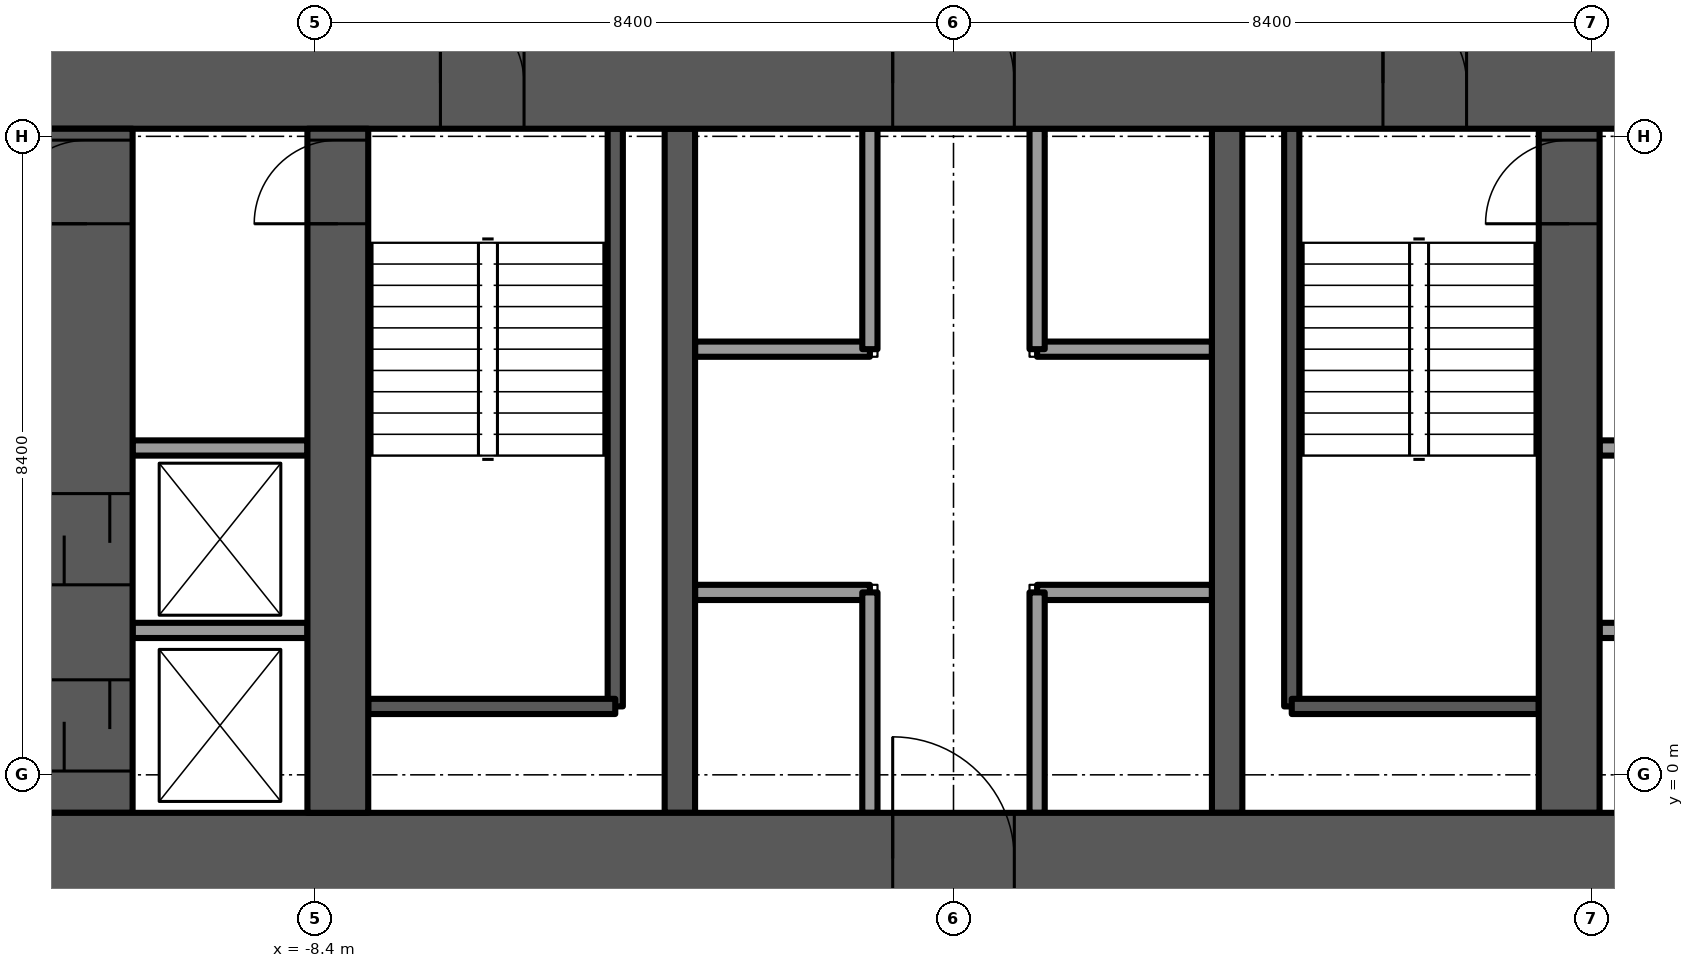
"""IFC4 building model, lengths in metres.
Left out: names, types, materials, properties, quantities, classifications, styles, units other than length and angle.
Written with IfcOpenShell. Run it as: python <this file> out.ifc"""

import sys

from ifc_helpers import new_model, si_unit, direction, frame, frame_2d, origin, place, context, subcontext, project, spatial, rectangle, extrude, element, fill, save


model = new_model("IFC4")
c1 = context("Model", 3, precision=1e-05, world=origin(), true_north=direction((0.0, 1.0)))
c2 = subcontext(c1, "Body", "Model", "MODEL_VIEW")
j1 = project(units=[si_unit("LENGTHUNIT", "METRE"), si_unit("PLANEANGLEUNIT", "RADIAN")], contexts=[c1])
p1 = place(None, origin())
s1 = spatial("IfcSite", under=j1, at=p1, CompositionType="ELEMENT")
p2 = place(p1, origin())
s2 = spatial("IfcBuilding", under=s1, at=p2, CompositionType="ELEMENT")
p3 = place(p2, frame((0.0, 0.0, 50.5)))
s3 = spatial("IfcBuildingStorey", under=s2, at=p3, CompositionType="ELEMENT", Elevation=50.5)
p4 = place(p3, frame((-12.0, -1.1, -0.3), z_axis=(0.0, 0.0, 1.0), x_axis=(1.0, 0.0, 0.0)))
e1 = element("IfcWall", 1, at=p4, inside=s3, PredefinedType="SHEAR", context=c2, shape_type="SweptSolid", body=[
    extrude(rectangle(XDim=24.0, YDim=1.2, at=frame_2d((12.0, 0.0))), origin(), (0.0, 0.0, 1.0), 3.75),
])
p5 = place(p4, frame((11.2, 0.0, 0.0)))
e2 = element("IfcOpeningElement", 2, at=p5, cuts=e1, PredefinedType="OPENING", context=c2, shape_type="SweptSolid", body=[
    extrude(rectangle(XDim=1.6, YDim=2.1, at=frame_2d((0.8, 1.05))), frame((0.0, 0.6, 0.0), z_axis=(0.0, -1.0, 0.0), x_axis=(1.0, 0.0, 0.0)), (0.0, 0.0, 1.0), 1.2),
])
p6 = place(p3, frame((-12.0, 9.1, -0.3), z_axis=(0.0, 0.0, 1.0), x_axis=(1.0, 0.0, 0.0)))
e3 = element("IfcWall", 3, at=p6, inside=s3, PredefinedType="SHEAR", context=c2, shape_type="SweptSolid", body=[
    extrude(rectangle(XDim=24.0, YDim=1.2, at=frame_2d((12.0, 0.0))), origin(), (0.0, 0.0, 1.0), 3.75),
])
p7 = place(p6, frame((11.2, 0.0, 0.0)))
e4 = element("IfcOpeningElement", 4, at=p7, cuts=e3, PredefinedType="OPENING", context=c2, shape_type="SweptSolid", body=[
    extrude(rectangle(XDim=1.6, YDim=2.1, at=frame_2d((0.8, 1.05))), frame((0.0, 0.6, 0.0), z_axis=(0.0, -1.0, 0.0), x_axis=(1.0, 0.0, 0.0)), (0.0, 0.0, 1.0), 1.2),
])
p8 = place(p6, frame((5.25, 0.0, 0.0)))
e5 = element("IfcOpeningElement", 5, at=p8, cuts=e3, PredefinedType="OPENING", context=c2, shape_type="SweptSolid", body=[
    extrude(rectangle(XDim=1.1, YDim=2.1, at=frame_2d((0.55, 1.05))), frame((0.0, 0.6, 0.0), z_axis=(0.0, -1.0, 0.0), x_axis=(1.0, 0.0, 0.0)), (0.0, 0.0, 1.0), 1.2),
])
p9 = place(p6, frame((17.65, 0.0, 0.0)))
e6 = element("IfcOpeningElement", 6, at=p9, cuts=e3, PredefinedType="OPENING", context=c2, shape_type="SweptSolid", body=[
    extrude(rectangle(XDim=1.1, YDim=2.1, at=frame_2d((0.55, 1.05))), frame((0.0, 0.6, 0.0), z_axis=(0.0, -1.0, 0.0), x_axis=(1.0, 0.0, 0.0)), (0.0, 0.0, 1.0), 1.2),
])
p10 = place(p3, frame((-8.1, -0.5, -0.3), z_axis=(0.0, 0.0, 1.0), x_axis=(0.0, 1.0, 0.0)))
e7 = element("IfcWall", 7, at=p10, inside=s3, PredefinedType="SHEAR", context=c2, shape_type="SweptSolid", body=[
    extrude(rectangle(XDim=9.0, YDim=0.8, at=frame_2d((4.5, 0.0))), origin(), (0.0, 0.0, 1.0), 3.75),
])
p11 = place(p10, frame((7.75, 0.0, 0.0)))
e8 = element("IfcOpeningElement", 8, at=p11, cuts=e7, PredefinedType="OPENING", context=c2, shape_type="SweptSolid", body=[
    extrude(rectangle(XDim=1.1, YDim=2.1, at=frame_2d((0.55, 1.05))), frame((0.0, 0.4, 0.0), z_axis=(0.0, -1.0, 0.0), x_axis=(1.0, 0.0, 0.0)), (0.0, 0.0, 1.0), 0.8),
])
p12 = place(p3, frame((8.1, -0.5, -0.3), z_axis=(0.0, 0.0, 1.0), x_axis=(0.0, 1.0, 0.0)))
e9 = element("IfcWall", 9, at=p12, inside=s3, PredefinedType="SHEAR", context=c2, shape_type="SweptSolid", body=[
    extrude(rectangle(XDim=9.0, YDim=0.8, at=frame_2d((4.5, 0.0))), origin(), (0.0, 0.0, 1.0), 3.75),
])
p13 = place(p12, frame((7.75, 0.0, 0.0)))
e10 = element("IfcOpeningElement", 10, at=p13, cuts=e9, PredefinedType="OPENING", context=c2, shape_type="SweptSolid", body=[
    extrude(rectangle(XDim=1.1, YDim=2.1, at=frame_2d((0.55, 1.05))), frame((0.0, 0.4, 0.0), z_axis=(0.0, -1.0, 0.0), x_axis=(1.0, 0.0, 0.0)), (0.0, 0.0, 1.0), 0.8),
])
for number, where, z_axis, x_axis in (
    (11, (-3.6, -0.5, -0.3), (0.0, 0.0, 1.0), (0.0, 1.0, 0.0)),
    (12, (3.6, -0.5, -0.3), (0.0, 0.0, 1.0), (0.0, 1.0, 0.0)),
):
    element("IfcWall", number, at=place(p3, frame(where, z_axis=z_axis, x_axis=x_axis)), inside=s3, PredefinedType="SHEAR", context=c2, shape_type="SweptSolid", body=[
        extrude(rectangle(XDim=9.0, YDim=0.4, at=frame_2d((4.5, 0.0))), origin(), (0.0, 0.0, 1.0), 3.75),
    ])
p14 = place(p3, frame((-11.4, -0.5, -0.3), z_axis=(0.0, 0.0, 1.0), x_axis=(0.0, 1.0, 0.0)))
e13 = element("IfcWall", 13, at=p14, inside=s3, PredefinedType="SHEAR", context=c2, shape_type="SweptSolid", body=[
    extrude(rectangle(XDim=9.0, YDim=1.2, at=frame_2d((4.5, 0.0))), origin(), (0.0, 0.0, 1.0), 3.75),
])
p15 = place(p14, frame((7.75, 0.0, 0.0)))
e14 = element("IfcOpeningElement", 14, at=p15, cuts=e13, PredefinedType="OPENING", context=c2, shape_type="SweptSolid", body=[
    extrude(rectangle(XDim=1.1, YDim=2.1, at=frame_2d((0.55, 1.05))), frame((0.0, 0.6, 0.0), z_axis=(0.0, -1.0, 0.0), x_axis=(1.0, 0.0, 0.0)), (0.0, 0.0, 1.0), 1.2),
])
p16 = place(p14, frame((0.55, 0.0, 0.0)))
e15 = element("IfcOpeningElement", 15, at=p16, cuts=e13, PredefinedType="OPENING", context=c2, shape_type="SweptSolid", body=[
    extrude(rectangle(XDim=1.2, YDim=2.1, at=frame_2d((0.6, 1.05))), frame((0.0, 0.6, 0.0), z_axis=(0.0, -1.0, 0.0), x_axis=(1.0, 0.0, 0.0)), (0.0, 0.0, 1.0), 1.2),
])
p17 = place(p14, frame((3.0, 0.0, 0.0)))
e16 = element("IfcOpeningElement", 16, at=p17, cuts=e13, PredefinedType="OPENING", context=c2, shape_type="SweptSolid", body=[
    extrude(rectangle(XDim=1.2, YDim=2.1, at=frame_2d((0.6, 1.05))), frame((0.0, 0.6, 0.0), z_axis=(0.0, -1.0, 0.0), x_axis=(1.0, 0.0, 0.0)), (0.0, 0.0, 1.0), 1.2),
])
p18 = place(p3, frame((-8.993, 20.292, 0.0), z_axis=(0.0, 0.0, 1.0), x_axis=(-0.49999960747, -0.866025630412, 0.0)))
e17 = element("IfcWall", 17, at=p18, inside=s3, PredefinedType="SOLIDWALL", context=c2, shape_type="SweptSolid", body=[
    extrude(rectangle(XDim=23.384, YDim=0.15, at=frame_2d((11.692, 0.0))), origin(), (0.0, 0.0, 1.0), 3.45),
])
p19 = place(p18, frame((3.825, 0.0, 0.15)))
e18 = element("IfcOpeningElement", 18, at=p19, cuts=e17, PredefinedType="OPENING", context=c2, shape_type="SweptSolid", body=[
    extrude(rectangle(XDim=1.5, YDim=2.85, at=frame_2d((0.75, 1.425))), frame((0.0, 0.075, 0.0), z_axis=(0.0, -1.0, 0.0), x_axis=(1.0, 0.0, 0.0)), (0.0, 0.0, 1.0), 0.15),
])
p20 = place(p18, frame((7.687, 0.0, 0.15)))
e19 = element("IfcOpeningElement", 19, at=p20, cuts=e17, PredefinedType="OPENING", context=c2, shape_type="SweptSolid", body=[
    extrude(rectangle(XDim=1.5, YDim=2.85, at=frame_2d((0.75, 1.425))), frame((0.0, 0.075, 0.0), z_axis=(0.0, -1.0, 0.0), x_axis=(1.0, 0.0, 0.0)), (0.0, 0.0, 1.0), 0.15),
])
p21 = place(p18, frame((11.278, 0.0, 0.15)))
e20 = element("IfcOpeningElement", 20, at=p21, cuts=e17, PredefinedType="OPENING", context=c2, shape_type="SweptSolid", body=[
    extrude(rectangle(XDim=1.8, YDim=2.85, at=frame_2d((0.9, 1.425))), frame((0.0, 0.075, 0.0), z_axis=(0.0, -1.0, 0.0), x_axis=(1.0, 0.0, 0.0)), (0.0, 0.0, 1.0), 0.15),
])
p22 = place(p18, frame((13.377, 0.0, 0.15)))
e21 = element("IfcOpeningElement", 21, at=p22, cuts=e17, PredefinedType="OPENING", context=c2, shape_type="SweptSolid", body=[
    extrude(rectangle(XDim=1.5, YDim=2.85, at=frame_2d((0.75, 1.425))), frame((0.0, 0.075, 0.0), z_axis=(0.0, -1.0, 0.0), x_axis=(1.0, 0.0, 0.0)), (0.0, 0.0, 1.0), 0.15),
])
p23 = place(p18, frame((15.478, 0.0, 0.15)))
e22 = element("IfcOpeningElement", 22, at=p23, cuts=e17, PredefinedType="OPENING", context=c2, shape_type="SweptSolid", body=[
    extrude(rectangle(XDim=1.8, YDim=2.85, at=frame_2d((0.9, 1.425))), frame((0.0, 0.075, 0.0), z_axis=(0.0, -1.0, 0.0), x_axis=(1.0, 0.0, 0.0)), (0.0, 0.0, 1.0), 0.15),
])
p24 = place(p18, frame((17.577, 0.0, 0.15)))
e23 = element("IfcOpeningElement", 23, at=p24, cuts=e17, PredefinedType="OPENING", context=c2, shape_type="SweptSolid", body=[
    extrude(rectangle(XDim=1.5, YDim=2.85, at=frame_2d((0.75, 1.425))), frame((0.0, 0.075, 0.0), z_axis=(0.0, -1.0, 0.0), x_axis=(1.0, 0.0, 0.0)), (0.0, 0.0, 1.0), 0.15),
])
p25 = place(p18, frame((0.339, 0.0, 0.15)))
e24 = element("IfcOpeningElement", 24, at=p25, cuts=e17, PredefinedType="OPENING", context=c2, shape_type="SweptSolid", body=[
    extrude(rectangle(XDim=1.8, YDim=2.73, at=frame_2d((0.9, 1.365))), frame((0.0, 0.075, 0.0), z_axis=(0.0, -1.0, 0.0), x_axis=(1.0, 0.0, 0.0)), (0.0, 0.0, 1.0), 0.15),
])
p26 = place(p18, frame((21.12, 0.0, 0.15)))
e25 = element("IfcOpeningElement", 25, at=p26, cuts=e17, PredefinedType="OPENING", context=c2, shape_type="SweptSolid", body=[
    extrude(rectangle(XDim=1.8, YDim=2.73, at=frame_2d((0.9, 1.365))), frame((0.0, 0.075, 0.0), z_axis=(0.0, -1.0, 0.0), x_axis=(1.0, 0.0, 0.0)), (0.0, 0.0, 1.0), 0.15),
])
p27 = place(p3, frame((-20.685, -1.023, 0.0), z_axis=(0.0, 0.0, 1.0), x_axis=(0.500004426522, -0.866022848116, 0.0)))
e26 = element("IfcWall", 26, at=p27, inside=s3, PredefinedType="SOLIDWALL", context=c2, shape_type="SweptSolid", body=[
    extrude(rectangle(XDim=18.912, YDim=0.15, at=frame_2d((9.456, 0.0))), origin(), (0.0, 0.0, 1.0), 3.45),
])
p28 = place(p27, frame((1.356, 0.0, 0.15)))
e27 = element("IfcOpeningElement", 27, at=p28, cuts=e26, PredefinedType="OPENING", context=c2, shape_type="SweptSolid", body=[
    extrude(rectangle(XDim=0.9, YDim=2.85, at=frame_2d((0.45, 1.425))), frame((0.0, 0.075, 0.0), z_axis=(0.0, -1.0, 0.0), x_axis=(1.0, 0.0, 0.0)), (0.0, 0.0, 1.0), 0.15),
])
p29 = place(p27, frame((5.556, 0.0, 0.15)))
e28 = element("IfcOpeningElement", 28, at=p29, cuts=e26, PredefinedType="OPENING", context=c2, shape_type="SweptSolid", body=[
    extrude(rectangle(XDim=1.8, YDim=2.85, at=frame_2d((0.9, 1.425))), frame((0.0, 0.075, 0.0), z_axis=(0.0, -1.0, 0.0), x_axis=(1.0, 0.0, 0.0)), (0.0, 0.0, 1.0), 0.15),
])
p30 = place(p27, frame((7.656, 0.0, 0.0)))
e29 = element("IfcOpeningElement", 29, at=p30, cuts=e26, PredefinedType="OPENING", context=c2, shape_type="SweptSolid", body=[
    extrude(rectangle(XDim=1.5, YDim=2.4, at=frame_2d((0.75, 1.2))), frame((0.0, 0.075, 0.0), z_axis=(0.0, -1.0, 0.0), x_axis=(1.0, 0.0, 0.0)), (0.0, 0.0, 1.0), 0.15),
])
p31 = place(p27, frame((9.756, 0.0, 0.15)))
e30 = element("IfcOpeningElement", 30, at=p31, cuts=e26, PredefinedType="OPENING", context=c2, shape_type="SweptSolid", body=[
    extrude(rectangle(XDim=1.8, YDim=2.85, at=frame_2d((0.9, 1.425))), frame((0.0, 0.075, 0.0), z_axis=(0.0, -1.0, 0.0), x_axis=(1.0, 0.0, 0.0)), (0.0, 0.0, 1.0), 0.15),
])
p32 = place(p27, frame((11.856, 0.0, 0.0)))
e31 = element("IfcOpeningElement", 31, at=p32, cuts=e26, PredefinedType="OPENING", context=c2, shape_type="SweptSolid", body=[
    extrude(rectangle(XDim=1.5, YDim=2.4, at=frame_2d((0.75, 1.2))), frame((0.0, 0.075, 0.0), z_axis=(0.0, -1.0, 0.0), x_axis=(1.0, 0.0, 0.0)), (0.0, 0.0, 1.0), 0.15),
])
p33 = place(p27, frame((13.956, 0.0, 0.15)))
e32 = element("IfcOpeningElement", 32, at=p33, cuts=e26, PredefinedType="OPENING", context=c2, shape_type="SweptSolid", body=[
    extrude(rectangle(XDim=1.8, YDim=2.85, at=frame_2d((0.9, 1.425))), frame((0.0, 0.075, 0.0), z_axis=(0.0, -1.0, 0.0), x_axis=(1.0, 0.0, 0.0)), (0.0, 0.0, 1.0), 0.15),
])
p34 = place(p27, frame((16.056, 0.0, 0.0)))
e33 = element("IfcOpeningElement", 33, at=p34, cuts=e26, PredefinedType="OPENING", context=c2, shape_type="SweptSolid", body=[
    extrude(rectangle(XDim=1.5, YDim=2.4, at=frame_2d((0.75, 1.2))), frame((0.0, 0.075, 0.0), z_axis=(0.0, -1.0, 0.0), x_axis=(1.0, 0.0, 0.0)), (0.0, 0.0, 1.0), 0.15),
])
for number, where, z_axis, x_axis in (
    (34, (-3.4, 2.4, 0.0), (0.0, 0.0, 1.0), (1.0, 0.0, 0.0)),
    (35, (-3.4, 5.6, 0.0), (0.0, 0.0, 1.0), (1.0, 0.0, 0.0)),
    (36, (1.1, 2.4, 0.0), (0.0, 0.0, 1.0), (1.0, 0.0, 0.0)),
    (37, (1.1, 5.6, 0.0), (0.0, 0.0, 1.0), (1.0, 0.0, 0.0)),
):
    element("IfcWall", number, at=place(p3, frame(where, z_axis=z_axis, x_axis=x_axis)), inside=s3, PredefinedType="PARTITIONING", context=c2, shape_type="SweptSolid", body=[
        extrude(rectangle(XDim=2.3, YDim=0.2, at=frame_2d((1.15, 0.0))), origin(), (0.0, 0.0, 1.0), 3.45),
    ])
for number, where, z_axis, x_axis in (
    (38, (-1.1, -0.5, 0.0), (0.0, 0.0, 1.0), (0.0, 1.0, 0.0)),
    (39, (1.1, -0.5, 0.0), (0.0, 0.0, 1.0), (0.0, 1.0, 0.0)),
    (40, (-1.1, 5.6, 0.0), (0.0, 0.0, 1.0), (0.0, 1.0, 0.0)),
    (41, (1.1, 5.6, 0.0), (0.0, 0.0, 1.0), (0.0, 1.0, 0.0)),
):
    element("IfcWall", number, at=place(p3, frame(where, z_axis=z_axis, x_axis=x_axis)), inside=s3, PredefinedType="PARTITIONING", context=c2, shape_type="SweptSolid", body=[
        extrude(rectangle(XDim=2.9, YDim=0.2, at=frame_2d((1.45, 0.0))), origin(), (0.0, 0.0, 1.0), 3.45),
    ])
p35 = place(p3, frame((-4.45, 0.9, -0.3), z_axis=(0.0, 0.0, 1.0), x_axis=(0.0, 1.0, 0.0)))
e42 = element("IfcWall", 42, at=p35, inside=s3, PredefinedType="SOLIDWALL", context=c2, shape_type="SweptSolid", body=[
    extrude(rectangle(XDim=7.6, YDim=0.2, at=frame_2d((3.8, 0.0))), origin(), (0.0, 0.0, 1.0), 3.75),
])
p36 = place(p3, frame((-7.7, 0.9, -0.3), z_axis=(0.0, 0.0, 1.0), x_axis=(1.0, 0.0, 0.0)))
e43 = element("IfcWall", 43, at=p36, inside=s3, PredefinedType="SOLIDWALL", context=c2, shape_type="SweptSolid", body=[
    extrude(rectangle(XDim=3.25, YDim=0.2, at=frame_2d((1.625, 0.0))), origin(), (0.0, 0.0, 1.0), 3.75),
])
p37 = place(p3, frame((4.45, 0.9, -0.3), z_axis=(0.0, 0.0, 1.0), x_axis=(0.0, 1.0, 0.0)))
e44 = element("IfcWall", 44, at=p37, inside=s3, PredefinedType="SOLIDWALL", context=c2, shape_type="SweptSolid", body=[
    extrude(rectangle(XDim=7.6, YDim=0.2, at=frame_2d((3.8, 0.0))), origin(), (0.0, 0.0, 1.0), 3.75),
])
p38 = place(p3, frame((4.45, 0.9, -0.3), z_axis=(0.0, 0.0, 1.0), x_axis=(1.0, 0.0, 0.0)))
e45 = element("IfcWall", 45, at=p38, inside=s3, PredefinedType="SOLIDWALL", context=c2, shape_type="SweptSolid", body=[
    extrude(rectangle(XDim=3.25, YDim=0.2, at=frame_2d((1.625, 0.0))), origin(), (0.0, 0.0, 1.0), 3.75),
])
for number, where, z_axis, x_axis in (
    (46, (-10.8, 1.9, 0.0), (0.0, 0.0, 1.0), (1.0, 0.0, 0.0)),
    (47, (-10.8, 4.3, 0.0), (0.0, 0.0, 1.0), (1.0, 0.0, 0.0)),
    (48, (8.5, 1.9, 0.0), (0.0, 0.0, 1.0), (1.0, 0.0, 0.0)),
    (49, (8.5, 4.3, 0.0), (0.0, 0.0, 1.0), (1.0, 0.0, 0.0)),
):
    element("IfcWall", number, at=place(p3, frame(where, z_axis=z_axis, x_axis=x_axis)), inside=s3, PredefinedType="PARTITIONING", context=c2, shape_type="SweptSolid", body=[
        extrude(rectangle(XDim=2.3, YDim=0.2, at=frame_2d((1.15, 0.0))), origin(), (0.0, 0.0, 1.0), 3.45),
    ])
p39 = place(p5, origin())
e50 = element("IfcDoor", 50, at=p39, inside=s3, OperationType="DOUBLE_DOOR_SINGLE_SWING", PredefinedType="DOOR", context=c2, shape_type="SweptSolid", body=[
    extrude(rectangle(XDim=1.6, YDim=2.1, at=frame_2d((0.8, 1.05))), frame((0.0, 0.025, 0.0), z_axis=(0.0, -1.0, 0.0), x_axis=(1.0, 0.0, 0.0)), (0.0, 0.0, 1.0), 0.05),
])
fill(e2, e50)
p40 = place(p7, origin())
e51 = element("IfcDoor", 51, at=p40, inside=s3, OperationType="DOUBLE_DOOR_SINGLE_SWING", PredefinedType="DOOR", context=c2, shape_type="SweptSolid", body=[
    extrude(rectangle(XDim=1.6, YDim=2.1, at=frame_2d((0.8, 1.05))), frame((0.0, 0.025, 0.0), z_axis=(0.0, -1.0, 0.0), x_axis=(1.0, 0.0, 0.0)), (0.0, 0.0, 1.0), 0.05),
])
fill(e4, e51)
p41 = place(p8, origin())
e52 = element("IfcDoor", 52, at=p41, inside=s3, OperationType="SINGLE_SWING_LEFT", PredefinedType="DOOR", context=c2, shape_type="SweptSolid", body=[
    extrude(rectangle(XDim=1.1, YDim=2.1, at=frame_2d((0.55, 1.05))), frame((0.0, 0.025, 0.0), z_axis=(0.0, -1.0, 0.0), x_axis=(1.0, 0.0, 0.0)), (0.0, 0.0, 1.0), 0.05),
])
fill(e5, e52)
p42 = place(p11, origin())
e53 = element("IfcDoor", 53, at=p42, inside=s3, OperationType="SINGLE_SWING_RIGHT", PredefinedType="DOOR", context=c2, shape_type="SweptSolid", body=[
    extrude(rectangle(XDim=1.1, YDim=2.1, at=frame_2d((0.55, 1.05))), frame((0.0, 0.025, 0.0), z_axis=(0.0, -1.0, 0.0), x_axis=(1.0, 0.0, 0.0)), (0.0, 0.0, 1.0), 0.05),
])
fill(e8, e53)
p43 = place(p9, origin())
e54 = element("IfcDoor", 54, at=p43, inside=s3, OperationType="SINGLE_SWING_RIGHT", PredefinedType="DOOR", context=c2, shape_type="SweptSolid", body=[
    extrude(rectangle(XDim=1.1, YDim=2.1, at=frame_2d((0.55, 1.05))), frame((0.0, 0.025, 0.0), z_axis=(0.0, -1.0, 0.0), x_axis=(1.0, 0.0, 0.0)), (0.0, 0.0, 1.0), 0.05),
])
fill(e6, e54)
p44 = place(p13, origin())
e55 = element("IfcDoor", 55, at=p44, inside=s3, OperationType="SINGLE_SWING_LEFT", PredefinedType="DOOR", context=c2, shape_type="SweptSolid", body=[
    extrude(rectangle(XDim=1.1, YDim=2.1, at=frame_2d((0.55, 1.05))), frame((0.0, 0.025, 0.0), z_axis=(0.0, -1.0, 0.0), x_axis=(1.0, 0.0, 0.0)), (0.0, 0.0, 1.0), 0.05),
])
fill(e10, e55)
p45 = place(p15, origin())
e56 = element("IfcDoor", 56, at=p45, inside=s3, OperationType="SINGLE_SWING_LEFT", PredefinedType="DOOR", context=c2, shape_type="SweptSolid", body=[
    extrude(rectangle(XDim=1.1, YDim=2.1, at=frame_2d((0.55, 1.05))), frame((0.0, 0.025, 0.0), z_axis=(0.0, -1.0, 0.0), x_axis=(1.0, 0.0, 0.0)), (0.0, 0.0, 1.0), 0.05),
])
fill(e14, e56)
p46 = place(p16, origin())
e57 = element("IfcDoor", 57, at=p46, inside=s3, OperationType="SLIDING_TO_LEFT", PredefinedType="DOOR", context=c2, shape_type="SweptSolid", body=[
    extrude(rectangle(XDim=1.2, YDim=2.1, at=frame_2d((0.6, 1.05))), frame((0.0, 0.025, 0.0), z_axis=(0.0, -1.0, 0.0), x_axis=(1.0, 0.0, 0.0)), (0.0, 0.0, 1.0), 0.05),
])
fill(e15, e57)
p47 = place(p17, origin())
e58 = element("IfcDoor", 58, at=p47, inside=s3, OperationType="SLIDING_TO_LEFT", PredefinedType="DOOR", context=c2, shape_type="SweptSolid", body=[
    extrude(rectangle(XDim=1.2, YDim=2.1, at=frame_2d((0.6, 1.05))), frame((0.0, 0.025, 0.0), z_axis=(0.0, -1.0, 0.0), x_axis=(1.0, 0.0, 0.0)), (0.0, 0.0, 1.0), 0.05),
])
fill(e16, e58)
save(model, sys.argv[1])
